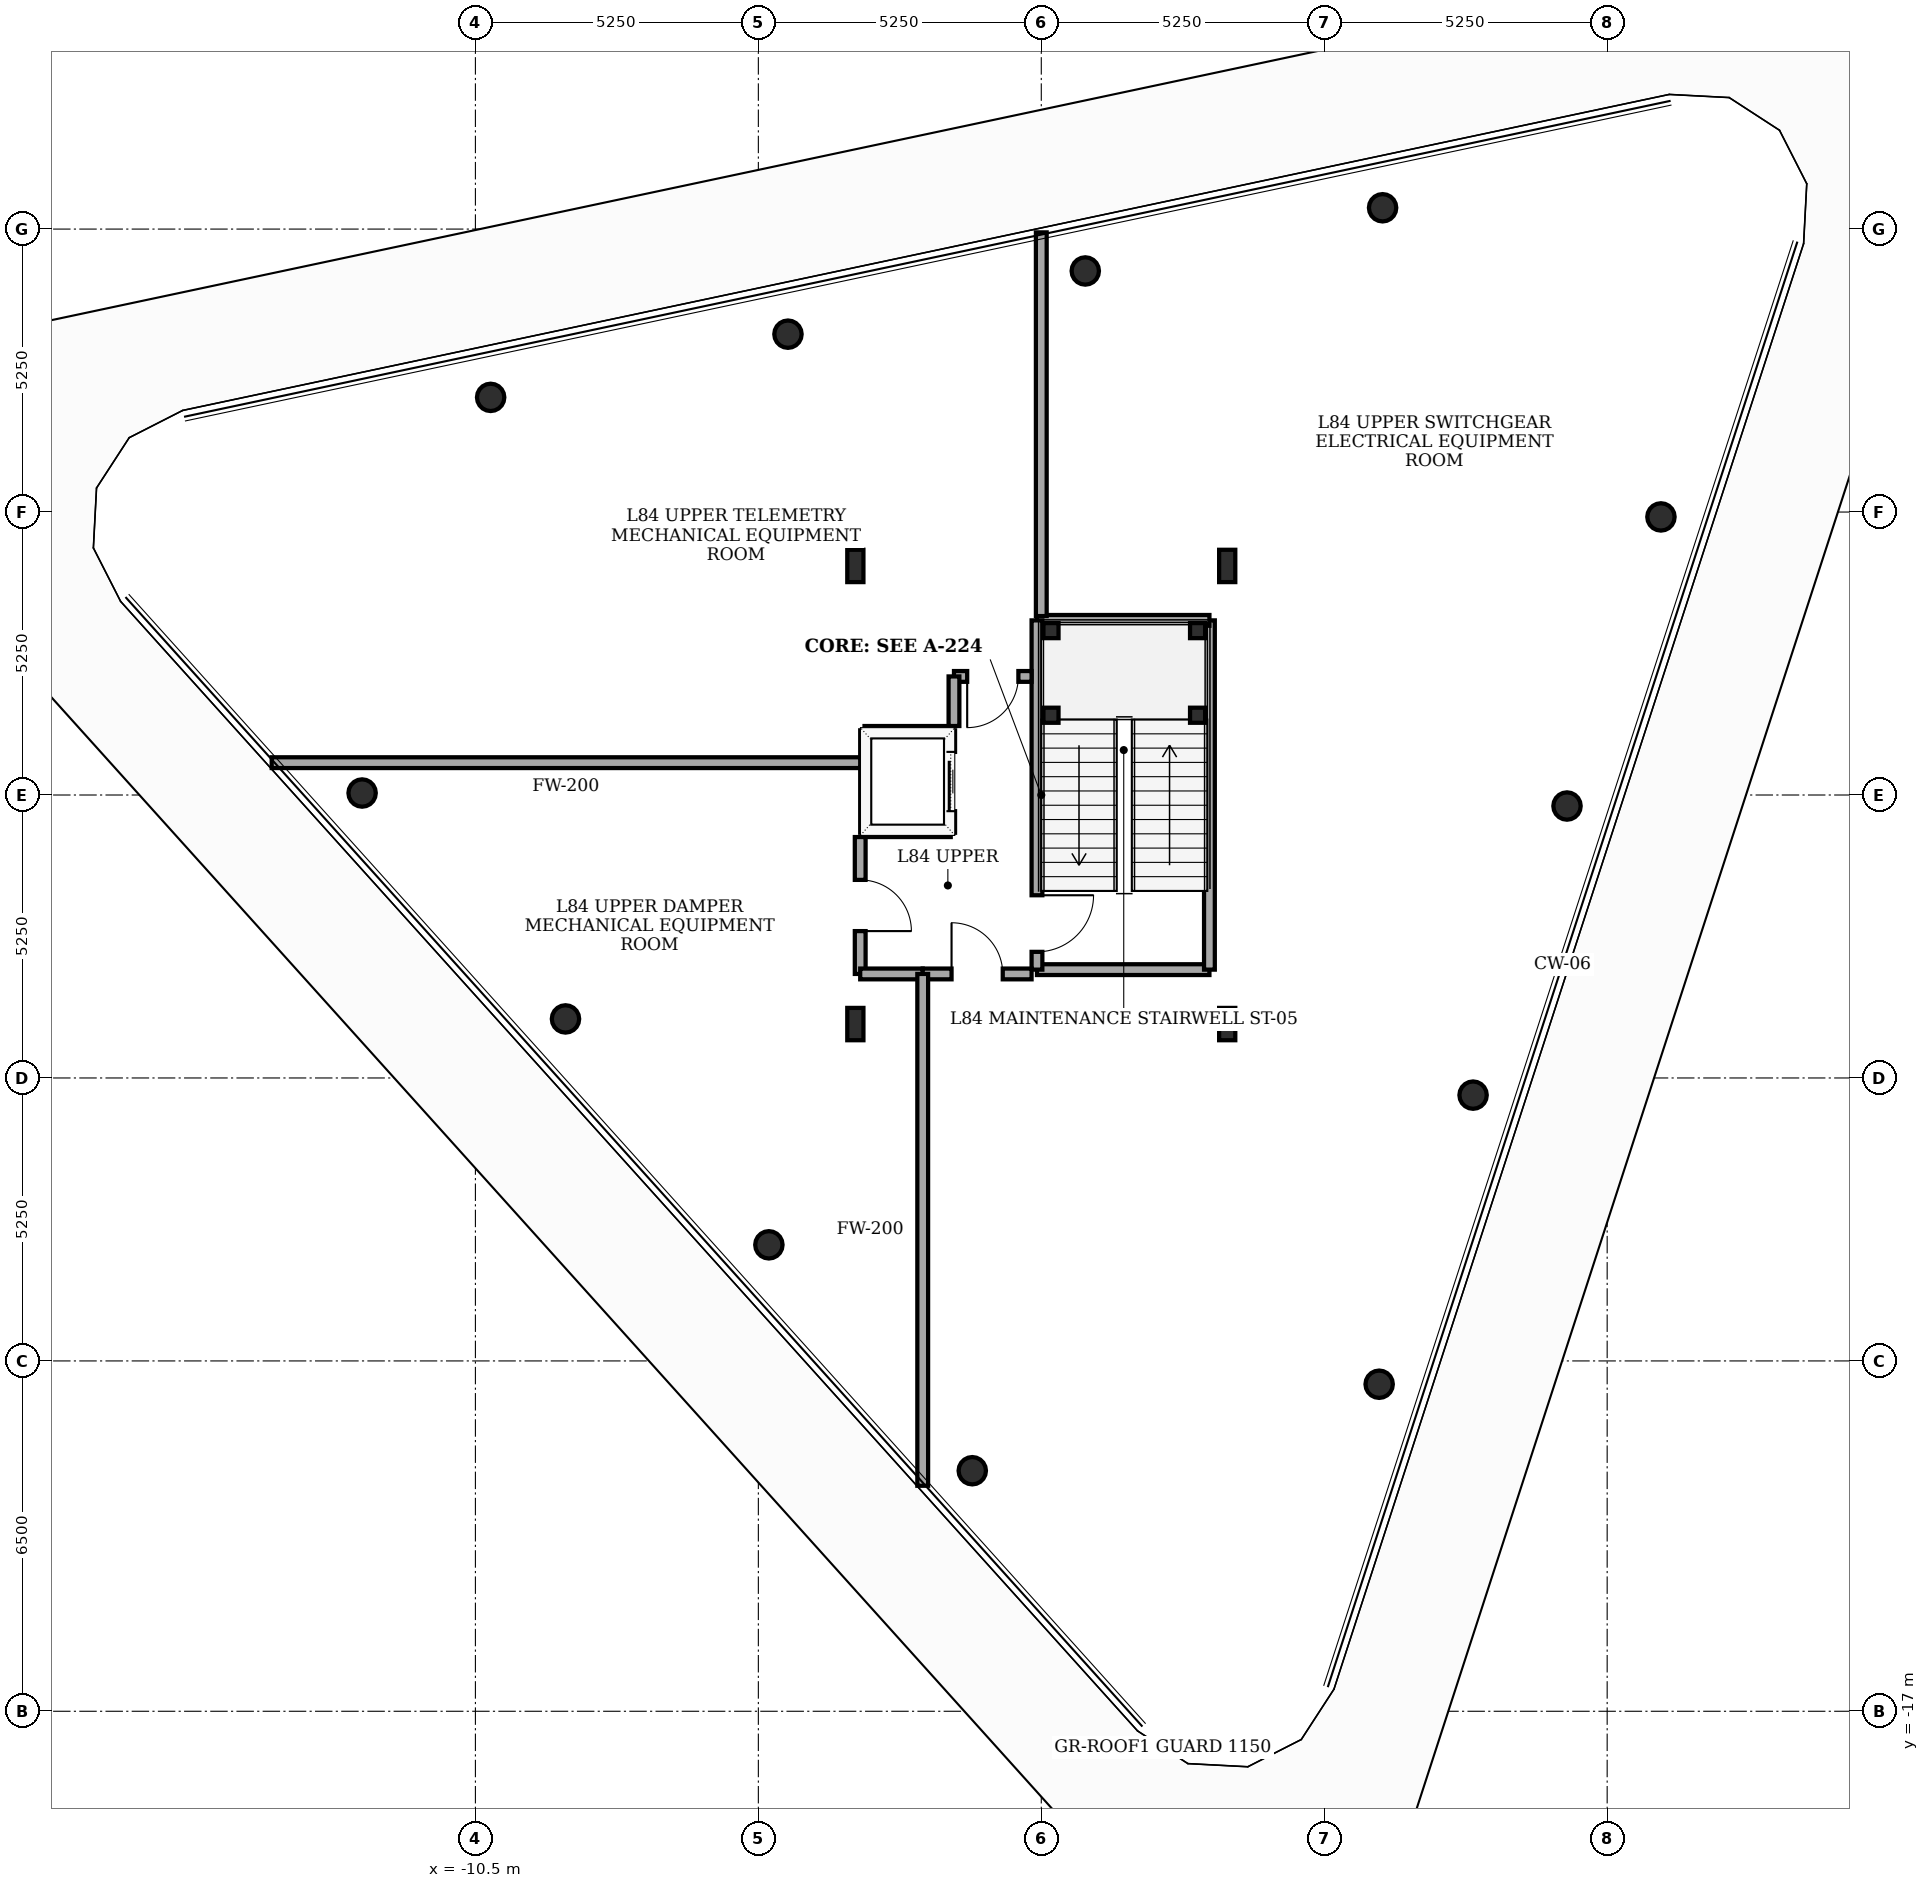
"""IFC4 building model, lengths in metres.
Left out: names, types, materials, properties, quantities, classifications, styles, units other than length and angle.
Written with IfcOpenShell. Run it as: python <this file> out.ifc"""

import sys

from ifc_helpers import new_model, si_unit, direction, frame, frame_2d, origin, origin_2d, place, context, subcontext, project, spatial, rectangle, hollow_circle, i_section, extrude, element, fill, save


model = new_model("IFC4")
c1 = context("Model", 3, precision=1e-05, world=origin(), true_north=direction((0.0, 1.0)))
c2 = subcontext(c1, "Body", "Model", "MODEL_VIEW")
j1 = project(units=[si_unit("LENGTHUNIT", "METRE"), si_unit("PLANEANGLEUNIT", "RADIAN")], contexts=[c1])
p1 = place(None, origin())
s1 = spatial("IfcSite", under=j1, at=p1, CompositionType="ELEMENT")
p2 = place(p1, origin())
s2 = spatial("IfcBuilding", under=s1, at=p2, CompositionType="ELEMENT")
p3 = place(p2, frame((0.0, 0.0, 326.6)))
s3 = spatial("IfcBuildingStorey", under=s2, at=p3, CompositionType="ELEMENT", Elevation=326.6)
for number, where, z_axis, x_axis in (
    (1, (-3.45, -4.25, 0.0), (0.0, 0.0, 1.0), (1.0, 0.0, 0.0)),
    (2, (3.45, -4.25, 0.0), (0.0, 0.0, 1.0), (1.0, 0.0, 0.0)),
    (3, (3.45, 4.25, 0.0), (0.0, 0.0, 1.0), (1.0, 0.0, 0.0)),
    (4, (-3.45, 4.25, 0.0), (0.0, 0.0, 1.0), (1.0, 0.0, 0.0)),
):
    element("IfcColumn", number, at=place(p3, frame(where, z_axis=z_axis, x_axis=x_axis)), inside=s3, PredefinedType="COLUMN", context=c2, shape_type="SweptSolid", body=[
        extrude(i_section(OverallWidth=0.3, OverallDepth=0.6, WebThickness=0.015, FlangeThickness=0.03, at=origin_2d()), origin(), (0.0, 0.0, 1.0), 4.2),
    ])
for number, where, z_axis, x_axis in (
    (5, (6.269, -10.932, 0.0), (0.0, 0.0, 1.0), (0.309, 0.951, 0.0)),
    (6, (8.012, -5.568, 0.0), (0.0, 0.0, 1.0), (0.309, 0.951, 0.0)),
    (7, (9.755, -0.204, 0.0), (0.0, 0.0, 1.0), (0.309, 0.951, 0.0)),
    (8, (11.498, 5.159, 0.0), (0.0, 0.0, 1.0), (0.309, 0.951, 0.0)),
    (9, (6.333, 10.896, 0.0), (0.0, 0.0, 1.0), (0.309, 0.951, 0.0)),
    (10, (0.816, 9.723, 0.0), (0.0, 0.0, 1.0), (0.309, 0.951, 0.0)),
    (11, (-4.7, 8.55, 0.0), (0.0, 0.0, 1.0), (0.309, 0.951, 0.0)),
    (12, (-10.217, 7.378, 0.0), (0.0, 0.0, 1.0), (0.309, 0.951, 0.0)),
    (13, (-12.602, 0.037, 0.0), (0.0, 0.0, 1.0), (0.309, 0.951, 0.0)),
    (14, (-8.828, -4.155, 0.0), (0.0, 0.0, 1.0), (0.309, 0.951, 0.0)),
    (15, (-5.054, -8.346, 0.0), (0.0, 0.0, 1.0), (0.309, 0.951, 0.0)),
    (16, (-1.281, -12.537, 0.0), (0.0, 0.0, 1.0), (0.309, 0.951, 0.0)),
):
    element("IfcColumn", number, at=place(p3, frame(where, z_axis=z_axis, x_axis=x_axis)), inside=s3, PredefinedType="COLUMN", context=c2, shape_type="SweptSolid", body=[
        extrude(hollow_circle(Radius=0.254, WallThickness=0.025, at=origin_2d()), origin(), (0.0, 0.0, 1.0), 4.2),
    ])
for number, where, z_axis, x_axis in (
    (17, (0.18, 1.48, 0.0), (0.0, 0.0, 1.0), (1.0, 0.0, 0.0)),
    (18, (2.9, 1.48, 0.0), (0.0, 0.0, 1.0), (1.0, 0.0, 0.0)),
    (19, (0.18, 3.05, 0.0), (0.0, 0.0, 1.0), (1.0, 0.0, 0.0)),
    (20, (2.9, 3.05, 0.0), (0.0, 0.0, 1.0), (1.0, 0.0, 0.0)),
):
    element("IfcColumn", number, at=place(p3, frame(where, z_axis=z_axis, x_axis=x_axis)), inside=s3, PredefinedType="PILASTER", context=c2, shape_type="SweptSolid", body=[
        extrude(i_section(OverallWidth=0.28, OverallDepth=0.28, WebThickness=0.01, FlangeThickness=0.018, at=origin_2d()), origin(), (0.0, 0.0, 1.0), 4.2),
    ])
p4 = place(p3, frame((-0.08, -3.24, 0.0), z_axis=(0.0, 0.0, 1.0), x_axis=(1.0, 0.0, 0.0)))
e21 = element("IfcWall", 21, at=p4, inside=s3, PredefinedType="SOLIDWALL", context=c2, shape_type="SweptSolid", body=[
    extrude(rectangle(XDim=3.2, YDim=0.2, at=frame_2d((1.6, 0.0))), origin(), (0.0, 0.0, 1.0), 3.98),
])
p5 = place(p3, frame((3.12, -3.24, 0.0), z_axis=(0.0, 0.0, 1.0), x_axis=(0.0, 1.0, 0.0)))
e22 = element("IfcWall", 22, at=p5, inside=s3, PredefinedType="SOLIDWALL", context=c2, shape_type="SweptSolid", body=[
    extrude(rectangle(XDim=6.48, YDim=0.2, at=frame_2d((3.24, 0.0))), origin(), (0.0, 0.0, 1.0), 2.565),
])
p6 = place(p3, frame((3.12, 3.24, 0.0), z_axis=(0.0, 0.0, 1.0), x_axis=(-1.0, 0.0, 0.0)))
e23 = element("IfcWall", 23, at=p6, inside=s3, PredefinedType="SOLIDWALL", context=c2, shape_type="SweptSolid", body=[
    extrude(rectangle(XDim=3.2, YDim=0.2, at=frame_2d((1.6, 0.0))), origin(), (0.0, 0.0, 1.0), 3.98),
])
p7 = place(p3, frame((-0.08, 3.24, 0.0), z_axis=(0.0, 0.0, 1.0), x_axis=(0.0, -1.0, 0.0)))
e24 = element("IfcWall", 24, at=p7, inside=s3, PredefinedType="SOLIDWALL", context=c2, shape_type="SweptSolid", body=[
    extrude(rectangle(XDim=6.48, YDim=0.2, at=frame_2d((3.24, 0.0))), origin(), (0.0, 0.0, 1.0), 3.98),
])
p8 = place(p7, frame((5.1, 0.0, 0.0)))
e25 = element("IfcOpeningElement", 25, at=p8, cuts=e24, PredefinedType="OPENING", context=c2, shape_type="SweptSolid", body=[
    extrude(rectangle(XDim=1.05, YDim=2.15, at=frame_2d((0.525, 1.075))), frame((0.0, 0.11, 0.0), z_axis=(0.0, -1.0, 0.0), x_axis=(1.0, 0.0, 0.0)), (0.0, 0.0, 1.0), 0.22),
])
p9 = place(p3, frame((-3.28, -0.7, 0.0), z_axis=(0.0, 0.0, 1.0), x_axis=(0.0, 1.0, 0.0)))
e26 = element("IfcWall", 26, at=p9, inside=s3, PredefinedType="SOLIDWALL", context=c2, shape_type="SweptSolid", body=[
    extrude(rectangle(XDim=1.9, YDim=0.16, at=frame_2d((0.95, 0.0))), origin(), (0.0, 0.0, 1.0), 2.565),
])
for number, where, z_axis, x_axis in (
    (27, (-3.28, 1.2, 0.0), (0.0, 0.0, 1.0), (1.0, 0.0, 0.0)),
    (28, (-1.68, -0.7, 0.0), (0.0, 0.0, 1.0), (-1.0, 0.0, 0.0)),
):
    element("IfcWall", number, at=place(p3, frame(where, z_axis=z_axis, x_axis=x_axis)), inside=s3, PredefinedType="SOLIDWALL", context=c2, shape_type="SweptSolid", body=[
        extrude(rectangle(XDim=1.6, YDim=0.16, at=frame_2d((0.8, 0.0))), origin(), (0.0, 0.0, 1.0), 2.565),
    ])
p10 = place(p3, frame((-1.68, -0.7, 0.0), z_axis=(0.0, 0.0, 1.0), x_axis=(0.0, 1.0, 0.0)))
e29 = element("IfcWall", 29, at=p10, inside=s3, PredefinedType="SOLIDWALL", context=c2, shape_type="SweptSolid", body=[
    extrude(rectangle(XDim=1.9, YDim=0.16, at=frame_2d((0.95, 0.0))), origin(), (0.0, 0.0, 1.0), 3.98),
])
p11 = place(p10, frame((0.4, 0.0, 0.0)))
e30 = element("IfcOpeningElement", 30, at=p11, cuts=e29, PredefinedType="OPENING", context=c2, shape_type="SweptSolid", body=[
    extrude(rectangle(XDim=1.1, YDim=2.1, at=frame_2d((0.55, 1.05))), frame((0.0, 0.09, 0.0), z_axis=(0.0, -1.0, 0.0), x_axis=(1.0, 0.0, 0.0)), (0.0, 0.0, 1.0), 0.18),
])
p12 = place(p3, frame((-3.36, -0.78, 0.0), z_axis=(0.0, 0.0, 1.0), x_axis=(0.0, -1.0, 0.0)))
e31 = element("IfcWall", 31, at=p12, inside=s3, PredefinedType="SOLIDWALL", context=c2, shape_type="SweptSolid", body=[
    extrude(rectangle(XDim=2.54, YDim=0.2, at=frame_2d((1.27, 0.0))), origin(), (0.0, 0.0, 1.0), 2.565),
])
p13 = place(p12, frame((0.795, 0.0, 0.0)))
e32 = element("IfcOpeningElement", 32, at=p13, cuts=e31, PredefinedType="OPENING", context=c2, shape_type="SweptSolid", body=[
    extrude(rectangle(XDim=0.95, YDim=2.1, at=frame_2d((0.475, 1.05))), frame((0.0, 0.11, 0.0), z_axis=(0.0, -1.0, 0.0), x_axis=(1.0, 0.0, 0.0)), (0.0, 0.0, 1.0), 0.22),
])
p14 = place(p3, frame((-3.36, -3.32, 0.0), z_axis=(0.0, 0.0, 1.0), x_axis=(1.0, 0.0, 0.0)))
e33 = element("IfcWall", 33, at=p14, inside=s3, PredefinedType="SOLIDWALL", context=c2, shape_type="SweptSolid", body=[
    extrude(rectangle(XDim=1.16, YDim=0.2, at=frame_2d((0.58, 0.0))), origin(), (0.0, 0.0, 1.0), 2.565),
])
p15 = place(p3, frame((-2.2, -3.32, 0.0), z_axis=(0.0, 0.0, 1.0), x_axis=(1.0, 0.0, 0.0)))
e34 = element("IfcWall", 34, at=p15, inside=s3, PredefinedType="SOLIDWALL", context=c2, shape_type="SweptSolid", body=[
    extrude(rectangle(XDim=2.02, YDim=0.2, at=frame_2d((1.01, 0.0))), origin(), (0.0, 0.0, 1.0), 3.98),
])
p16 = place(p15, frame((0.535, 0.0, 0.0)))
e35 = element("IfcOpeningElement", 35, at=p16, cuts=e34, PredefinedType="OPENING", context=c2, shape_type="SweptSolid", body=[
    extrude(rectangle(XDim=0.95, YDim=2.1, at=frame_2d((0.475, 1.05))), frame((0.0, 0.11, 0.0), z_axis=(0.0, -1.0, 0.0), x_axis=(1.0, 0.0, 0.0)), (0.0, 0.0, 1.0), 0.22),
])
p17 = place(p3, frame((-0.18, 2.2, 0.0), z_axis=(0.0, 0.0, 1.0), x_axis=(-1.0, 0.0, 0.0)))
e36 = element("IfcWall", 36, at=p17, inside=s3, PredefinedType="SOLIDWALL", context=c2, shape_type="SweptSolid", body=[
    extrude(rectangle(XDim=1.44, YDim=0.2, at=frame_2d((0.72, 0.0))), origin(), (0.0, 0.0, 1.0), 3.98),
])
p18 = place(p17, frame((0.245, 0.0, 0.0)))
e37 = element("IfcOpeningElement", 37, at=p18, cuts=e36, PredefinedType="OPENING", context=c2, shape_type="SweptSolid", body=[
    extrude(rectangle(XDim=0.95, YDim=2.1, at=frame_2d((0.475, 1.05))), frame((0.0, 0.11, 0.0), z_axis=(0.0, -1.0, 0.0), x_axis=(1.0, 0.0, 0.0)), (0.0, 0.0, 1.0), 0.22),
])
p19 = place(p3, frame((-1.62, 2.2, 0.0), z_axis=(0.0, 0.0, 1.0), x_axis=(0.0, -1.0, 0.0)))
e38 = element("IfcWall", 38, at=p19, inside=s3, PredefinedType="SOLIDWALL", context=c2, shape_type="SweptSolid", body=[
    extrude(rectangle(XDim=0.92, YDim=0.2, at=frame_2d((0.46, 0.0))), origin(), (0.0, 0.0, 1.0), 3.98),
])
p20 = place(p3, frame((-2.2, -12.816, 0.0), z_axis=(0.0, 0.0, 1.0), x_axis=(0.0, 1.0, 0.0)))
e39 = element("IfcWall", 39, at=p20, inside=s3, PredefinedType="SOLIDWALL", context=c2, shape_type="SweptSolid", body=[
    extrude(rectangle(XDim=9.496, YDim=0.2, at=frame_2d((4.748, 0.0))), origin(), (0.0, 0.0, 1.0), 2.565),
])
p21 = place(p3, frame((-3.36, 0.6, 0.0), z_axis=(0.0, 0.0, 1.0), x_axis=(-1.0, 0.0, 0.0)))
e40 = element("IfcWall", 40, at=p21, inside=s3, PredefinedType="SOLIDWALL", context=c2, shape_type="SweptSolid", body=[
    extrude(rectangle(XDim=10.92, YDim=0.2, at=frame_2d((5.46, 0.0))), origin(), (0.0, 0.0, 1.0), 2.565),
])
p22 = place(p3, frame((0.0, 10.439, 0.0), z_axis=(0.0, 0.0, 1.0), x_axis=(0.0, -1.0, 0.0)))
e41 = element("IfcWall", 41, at=p22, inside=s3, PredefinedType="SOLIDWALL", context=c2, shape_type="SweptSolid", body=[
    extrude(rectangle(XDim=7.119, YDim=0.2, at=frame_2d((3.559, 0.0))), origin(), (0.0, 0.0, 1.0), 2.565),
])
p23 = place(p8, origin())
e42 = element("IfcDoor", 42, at=p23, inside=s3, OperationType="SINGLE_SWING_LEFT", PredefinedType="DOOR", context=c2, shape_type="SweptSolid", body=[
    extrude(rectangle(XDim=1.05, YDim=2.15, at=frame_2d((0.525, 1.075))), frame((0.0, 0.025, 0.0), z_axis=(0.0, -1.0, 0.0), x_axis=(1.0, 0.0, 0.0)), (0.0, 0.0, 1.0), 0.05),
])
fill(e25, e42)
p24 = place(p11, origin())
e43 = element("IfcDoor", 43, at=p24, inside=s3, OperationType="SLIDING_TO_LEFT", PredefinedType="DOOR", context=c2, shape_type="SweptSolid", body=[
    extrude(rectangle(XDim=1.1, YDim=2.1, at=frame_2d((0.55, 1.05))), frame((0.0, 0.025, 0.0), z_axis=(0.0, -1.0, 0.0), x_axis=(1.0, 0.0, 0.0)), (0.0, 0.0, 1.0), 0.05),
])
fill(e30, e43)
p25 = place(p13, origin())
e44 = element("IfcDoor", 44, at=p25, inside=s3, OperationType="SINGLE_SWING_RIGHT", PredefinedType="DOOR", context=c2, shape_type="SweptSolid", body=[
    extrude(rectangle(XDim=0.95, YDim=2.1, at=frame_2d((0.475, 1.05))), frame((0.0, 0.025, 0.0), z_axis=(0.0, -1.0, 0.0), x_axis=(1.0, 0.0, 0.0)), (0.0, 0.0, 1.0), 0.05),
])
fill(e32, e44)
p26 = place(p16, origin())
e45 = element("IfcDoor", 45, at=p26, inside=s3, OperationType="SINGLE_SWING_LEFT", PredefinedType="DOOR", context=c2, shape_type="SweptSolid", body=[
    extrude(rectangle(XDim=0.95, YDim=2.1, at=frame_2d((0.475, 1.05))), frame((0.0, 0.025, 0.0), z_axis=(0.0, -1.0, 0.0), x_axis=(1.0, 0.0, 0.0)), (0.0, 0.0, 1.0), 0.05),
])
fill(e35, e45)
p27 = place(p18, origin())
e46 = element("IfcDoor", 46, at=p27, inside=s3, OperationType="SINGLE_SWING_RIGHT", PredefinedType="DOOR", context=c2, shape_type="SweptSolid", body=[
    extrude(rectangle(XDim=0.95, YDim=2.1, at=frame_2d((0.475, 1.05))), frame((0.0, 0.025, 0.0), z_axis=(0.0, -1.0, 0.0), x_axis=(1.0, 0.0, 0.0)), (0.0, 0.0, 1.0), 0.05),
])
fill(e37, e46)
save(model, sys.argv[1])
